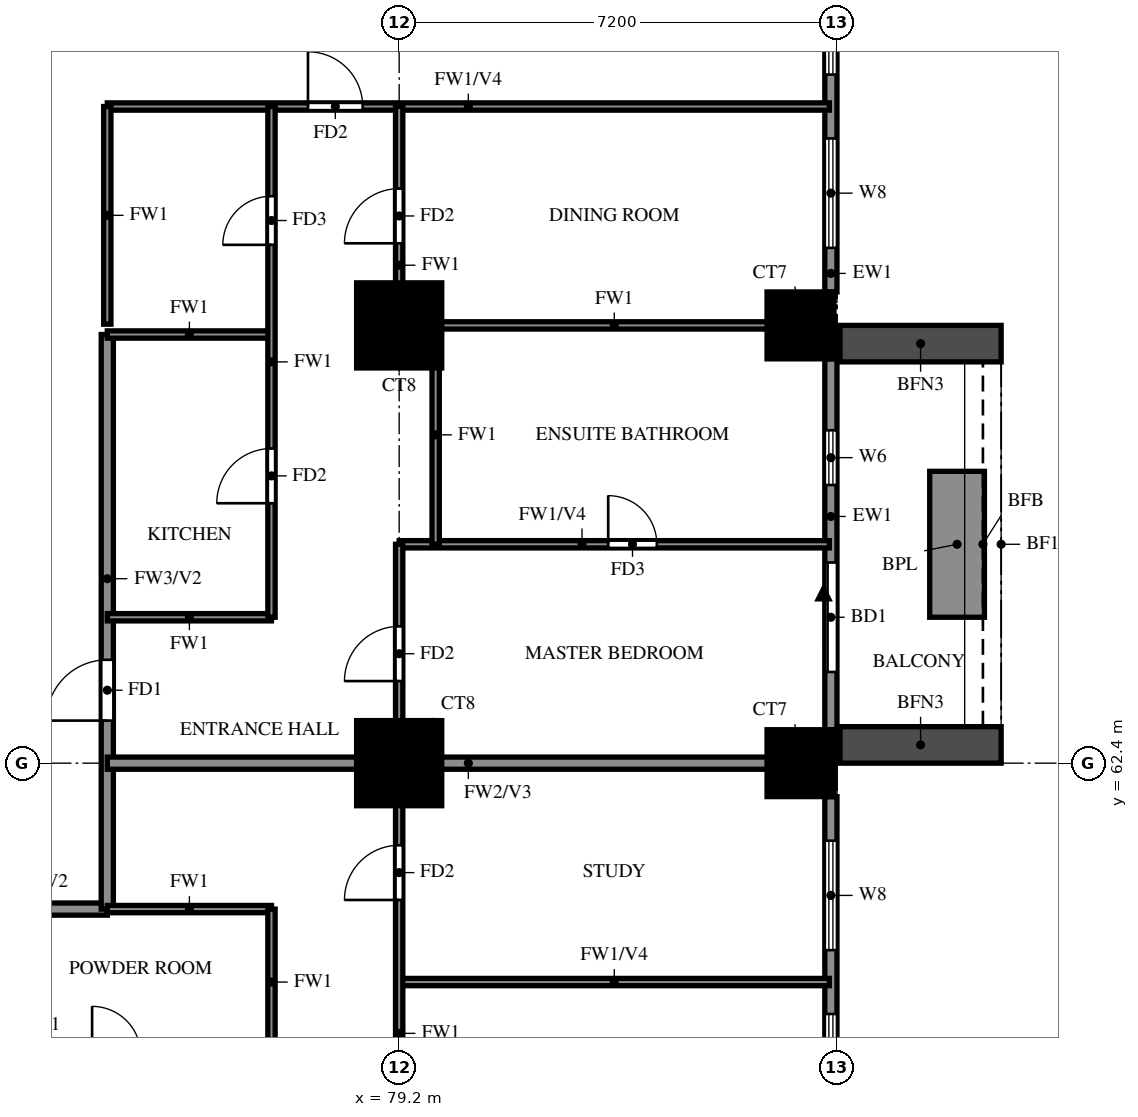
"""IFC4 building model, lengths in metres.
Left out: names, types, materials, properties, quantities, classifications, styles, units other than length and angle.
Written with IfcOpenShell. Run it as: python <this file> out.ifc"""

import sys

from ifc_helpers import new_model, si_unit, direction, frame, frame_2d, origin, origin_2d, place, context, subcontext, project, spatial, rectangle, extrude, source, transform, mapped, element, fill, save


model = new_model("IFC4")
c1 = context("Model", 3, precision=1e-05, world=origin(), true_north=direction((0.0, 1.0)))
c2 = subcontext(c1, "Body", "Model", "MODEL_VIEW")
j1 = project(units=[si_unit("LENGTHUNIT", "METRE"), si_unit("PLANEANGLEUNIT", "RADIAN")], contexts=[c1])
p1 = place(None, origin())
s1 = spatial("IfcSite", under=j1, at=p1, CompositionType="ELEMENT")
p2 = place(p1, origin())
s2 = spatial("IfcBuilding", under=s1, at=p2, CompositionType="ELEMENT")
p3 = place(p2, frame((0.0, 0.0, 41.0)))
s3 = spatial("IfcBuildingStorey", under=s2, at=p3, CompositionType="ELEMENT", Elevation=41.0)
m1 = source(origin(), c2, "Body", "SweptSolid", [
    extrude(rectangle(XDim=1.4, YDim=1.4, at=origin_2d()), origin(), (0.0, 0.0, 1.0), 3.18),
])
p4 = place(p3, frame((79.2, 62.4, 0.0), z_axis=(0.0, 0.0, 1.0), x_axis=(1.0, 0.0, 0.0)))
e1 = element("IfcColumn", 1, at=p4, inside=s3, PredefinedType="COLUMN", context=c2, shape_type="MappedRepresentation", body=[
    mapped(m1, transform((0.0, 0.0, 0.0))),
])
m2 = source(origin(), c2, "Body", "SweptSolid", [
    extrude(rectangle(XDim=1.1, YDim=1.1, at=origin_2d()), origin(), (0.0, 0.0, 1.0), 3.18),
])
p5 = place(p3, frame((85.8, 62.4, 0.0), z_axis=(0.0, 0.0, 1.0), x_axis=(1.0, 0.0, 0.0)))
e2 = element("IfcColumn", 2, at=p5, inside=s3, PredefinedType="COLUMN", context=c2, shape_type="MappedRepresentation", body=[
    mapped(m2, transform((0.0, 0.0, 0.0))),
])
p6 = place(p3, frame((79.2, 69.6, 0.0), z_axis=(0.0, 0.0, 1.0), x_axis=(1.0, 0.0, 0.0)))
e3 = element("IfcColumn", 3, at=p6, inside=s3, PredefinedType="COLUMN", context=c2, shape_type="MappedRepresentation", body=[
    mapped(m1, transform((0.0, 0.0, 0.0))),
])
p7 = place(p3, frame((85.8, 69.6, 0.0), z_axis=(0.0, 0.0, 1.0), x_axis=(1.0, 0.0, 0.0)))
e4 = element("IfcColumn", 4, at=p7, inside=s3, PredefinedType="COLUMN", context=c2, shape_type="MappedRepresentation", body=[
    mapped(m2, transform((0.0, 0.0, 0.0))),
])
p8 = place(p3, frame((86.3, 55.75, 0.0), z_axis=(0.0, 0.0, 1.0), x_axis=(0.0, 1.0, 0.0)))
e5 = element("IfcWall", 5, at=p8, inside=s3, PredefinedType="SOLIDWALL", context=c2, shape_type="SweptSolid", body=[
    extrude(rectangle(XDim=6.1, YDim=0.2, at=frame_2d((3.05, 0.0))), origin(), (0.0, 0.0, 1.0), 3.18),
])
p9 = place(p8, frame((0.725, 0.0, 0.6)))
e6 = element("IfcOpeningElement", 6, at=p9, cuts=e5, PredefinedType="OPENING", context=c2, shape_type="SweptSolid", body=[
    extrude(rectangle(XDim=1.8, YDim=2.4, at=frame_2d((0.9, 1.2))), frame((0.0, 0.11, 0.0), z_axis=(0.0, -1.0, 0.0), x_axis=(1.0, 0.0, 0.0)), (0.0, 0.0, 1.0), 0.22),
])
p10 = place(p8, frame((3.575, 0.0, 0.6)))
e7 = element("IfcOpeningElement", 7, at=p10, cuts=e5, PredefinedType="OPENING", context=c2, shape_type="SweptSolid", body=[
    extrude(rectangle(XDim=1.8, YDim=2.4, at=frame_2d((0.9, 1.2))), frame((0.0, 0.11, 0.0), z_axis=(0.0, -1.0, 0.0), x_axis=(1.0, 0.0, 0.0)), (0.0, 0.0, 1.0), 0.22),
])
p11 = place(p3, frame((86.3, 62.95, 0.0), z_axis=(0.0, 0.0, 1.0), x_axis=(0.0, 1.0, 0.0)))
e8 = element("IfcWall", 8, at=p11, inside=s3, PredefinedType="SOLIDWALL", context=c2, shape_type="SweptSolid", body=[
    extrude(rectangle(XDim=6.1, YDim=0.2, at=frame_2d((3.05, 0.0))), origin(), (0.0, 0.0, 1.0), 3.18),
])
p12 = place(p11, frame((0.95, 0.0, 0.0)))
e9 = element("IfcOpeningElement", 9, at=p12, cuts=e8, PredefinedType="OPENING", context=c2, shape_type="SweptSolid", body=[
    extrude(rectangle(XDim=1.8, YDim=2.4, at=frame_2d((0.9, 1.2))), frame((0.0, 0.11, 0.0), z_axis=(0.0, -1.0, 0.0), x_axis=(1.0, 0.0, 0.0)), (0.0, 0.0, 1.0), 0.22),
])
p13 = place(p11, frame((4.025, 0.0, 1.5)))
e10 = element("IfcOpeningElement", 10, at=p13, cuts=e8, PredefinedType="OPENING", context=c2, shape_type="SweptSolid", body=[
    extrude(rectangle(XDim=0.9, YDim=0.9, at=frame_2d((0.45, 0.45))), frame((0.0, 0.11, 0.0), z_axis=(0.0, -1.0, 0.0), x_axis=(1.0, 0.0, 0.0)), (0.0, 0.0, 1.0), 0.22),
])
p14 = place(p3, frame((86.3, 70.15, 0.0), z_axis=(0.0, 0.0, 1.0), x_axis=(0.0, 1.0, 0.0)))
e11 = element("IfcWall", 11, at=p14, inside=s3, PredefinedType="SOLIDWALL", context=c2, shape_type="SweptSolid", body=[
    extrude(rectangle(XDim=6.1, YDim=0.2, at=frame_2d((3.05, 0.0))), origin(), (0.0, 0.0, 1.0), 3.18),
])
p15 = place(p14, frame((0.725, 0.0, 0.6)))
e12 = element("IfcOpeningElement", 12, at=p15, cuts=e11, PredefinedType="OPENING", context=c2, shape_type="SweptSolid", body=[
    extrude(rectangle(XDim=1.8, YDim=2.4, at=frame_2d((0.9, 1.2))), frame((0.0, 0.11, 0.0), z_axis=(0.0, -1.0, 0.0), x_axis=(1.0, 0.0, 0.0)), (0.0, 0.0, 1.0), 0.22),
])
p16 = place(p14, frame((3.575, 0.0, 0.6)))
e13 = element("IfcOpeningElement", 13, at=p16, cuts=e11, PredefinedType="OPENING", context=c2, shape_type="SweptSolid", body=[
    extrude(rectangle(XDim=1.8, YDim=2.4, at=frame_2d((0.9, 1.2))), frame((0.0, 0.11, 0.0), z_axis=(0.0, -1.0, 0.0), x_axis=(1.0, 0.0, 0.0)), (0.0, 0.0, 1.0), 0.22),
])
for number, where, z_axis, x_axis in (
    (14, (86.45, 62.7, 0.0), (0.0, 0.0, 1.0), (1.0, 0.0, 0.0)),
    (15, (86.45, 69.3, 0.0), (0.0, 0.0, 1.0), (1.0, 0.0, 0.0)),
):
    element("IfcWall", number, at=place(p3, frame(where, z_axis=z_axis, x_axis=x_axis)), inside=s3, PredefinedType="SOLIDWALL", context=c2, shape_type="SweptSolid", body=[
        extrude(rectangle(XDim=2.65, YDim=0.6, at=frame_2d((1.325, 0.0))), origin(), (0.0, 0.0, 1.0), 2.85),
    ])
p17 = place(p3, frame((88.375, 64.8, 0.0), z_axis=(0.0, 0.0, 1.0), x_axis=(0.0, 1.0, 0.0)))
e16 = element("IfcWall", 16, at=p17, inside=s3, PredefinedType="SOLIDWALL", context=c2, shape_type="SweptSolid", body=[
    extrude(rectangle(XDim=2.4, YDim=0.9, at=frame_2d((1.2, 0.0))), origin(), (0.0, 0.0, 1.0), 0.9),
])
p18 = place(p3, frame((72.0, 60.0, 0.0), z_axis=(0.0, 0.0, 1.0), x_axis=(1.0, 0.0, 0.0)))
e17 = element("IfcWall", 17, at=p18, inside=s3, PredefinedType="SOLIDWALL", context=c2, shape_type="SweptSolid", body=[
    extrude(rectangle(XDim=2.4, YDim=0.2, at=frame_2d((1.2, 0.0))), origin(), (0.0, 0.0, 1.0), 3.18),
])
p19 = place(p3, frame((74.4, 60.0, 0.0), z_axis=(0.0, 0.0, 1.0), x_axis=(0.0, 1.0, 0.0)))
e18 = element("IfcWall", 18, at=p19, inside=s3, PredefinedType="SOLIDWALL", context=c2, shape_type="SweptSolid", body=[
    extrude(rectangle(XDim=9.45, YDim=0.2, at=frame_2d((4.725, 0.0))), origin(), (0.0, 0.0, 1.0), 3.18),
])
p20 = place(p19, frame((3.1, 0.0, 0.0)))
e19 = element("IfcOpeningElement", 19, at=p20, cuts=e18, PredefinedType="OPENING", context=c2, shape_type="SweptSolid", body=[
    extrude(rectangle(XDim=1.0, YDim=2.1, at=frame_2d((0.5, 1.05))), frame((0.0, 0.11, 0.0), z_axis=(0.0, -1.0, 0.0), x_axis=(1.0, 0.0, 0.0)), (0.0, 0.0, 1.0), 0.22),
])
p21 = place(p3, frame((74.4, 62.4, 0.0), z_axis=(0.0, 0.0, 1.0), x_axis=(1.0, 0.0, 0.0)))
e20 = element("IfcWall", 20, at=p21, inside=s3, PredefinedType="SOLIDWALL", context=c2, shape_type="SweptSolid", body=[
    extrude(rectangle(XDim=11.875, YDim=0.2, at=frame_2d((5.938, 0.0))), origin(), (0.0, 0.0, 1.0), 3.18),
])
p22 = place(p3, frame((79.2, 58.8, 0.0), z_axis=(0.0, 0.0, 1.0), x_axis=(1.0, 0.0, 0.0)))
e21 = element("IfcWall", 21, at=p22, inside=s3, PredefinedType="PARTITIONING", context=c2, shape_type="SweptSolid", body=[
    extrude(rectangle(XDim=7.075, YDim=0.12, at=frame_2d((3.538, 0.0))), origin(), (0.0, 0.0, 1.0), 2.28),
])
for number, where, z_axis, x_axis in (
    (22, (74.4, 60.0, 0.0), (0.0, 0.0, 1.0), (1.0, 0.0, 0.0)),
    (23, (74.4, 64.8, 0.0), (0.0, 0.0, 1.0), (1.0, 0.0, 0.0)),
):
    element("IfcWall", number, at=place(p3, frame(where, z_axis=z_axis, x_axis=x_axis)), inside=s3, PredefinedType="PARTITIONING", context=c2, shape_type="SweptSolid", body=[
        extrude(rectangle(XDim=2.7, YDim=0.12, at=frame_2d((1.35, 0.0))), origin(), (0.0, 0.0, 1.0), 3.18),
    ])
p23 = place(p3, frame((79.2, 66.0, 0.0), z_axis=(0.0, 0.0, 1.0), x_axis=(1.0, 0.0, 0.0)))
e24 = element("IfcWall", 24, at=p23, inside=s3, PredefinedType="PARTITIONING", context=c2, shape_type="SweptSolid", body=[
    extrude(rectangle(XDim=7.075, YDim=0.12, at=frame_2d((3.538, 0.0))), origin(), (0.0, 0.0, 1.0), 2.28),
])
p24 = place(p23, frame((3.438, 0.0, 0.0)))
e25 = element("IfcOpeningElement", 25, at=p24, cuts=e24, PredefinedType="OPENING", context=c2, shape_type="SweptSolid", body=[
    extrude(rectangle(XDim=0.8, YDim=2.1, at=frame_2d((0.4, 1.05))), frame((0.0, 0.07, 0.0), z_axis=(0.0, -1.0, 0.0), x_axis=(1.0, 0.0, 0.0)), (0.0, 0.0, 1.0), 0.14),
])
p25 = place(p3, frame((74.4, 69.45, 0.0), z_axis=(0.0, 0.0, 1.0), x_axis=(1.0, 0.0, 0.0)))
e26 = element("IfcWall", 26, at=p25, inside=s3, PredefinedType="PARTITIONING", context=c2, shape_type="SweptSolid", body=[
    extrude(rectangle(XDim=2.7, YDim=0.12, at=frame_2d((1.35, 0.0))), origin(), (0.0, 0.0, 1.0), 3.18),
])
p26 = place(p3, frame((79.2, 69.6, 0.0), z_axis=(0.0, 0.0, 1.0), x_axis=(1.0, 0.0, 0.0)))
e27 = element("IfcWall", 27, at=p26, inside=s3, PredefinedType="PARTITIONING", context=c2, shape_type="SweptSolid", body=[
    extrude(rectangle(XDim=7.075, YDim=0.12, at=frame_2d((3.538, 0.0))), origin(), (0.0, 0.0, 1.0), 3.18),
])
p27 = place(p3, frame((74.4, 73.2, 0.0), z_axis=(0.0, 0.0, 1.0), x_axis=(1.0, 0.0, 0.0)))
e28 = element("IfcWall", 28, at=p27, inside=s3, PredefinedType="PARTITIONING", context=c2, shape_type="SweptSolid", body=[
    extrude(rectangle(XDim=11.875, YDim=0.12, at=frame_2d((5.938, 0.0))), origin(), (0.0, 0.0, 1.0), 2.28),
])
p28 = place(p27, frame((3.3, 0.0, 0.0)))
e29 = element("IfcOpeningElement", 29, at=p28, cuts=e28, PredefinedType="OPENING", context=c2, shape_type="SweptSolid", body=[
    extrude(rectangle(XDim=0.9, YDim=2.1, at=frame_2d((0.45, 1.05))), frame((0.0, 0.07, 0.0), z_axis=(0.0, -1.0, 0.0), x_axis=(1.0, 0.0, 0.0)), (0.0, 0.0, 1.0), 0.14),
])
p29 = place(p3, frame((74.4, 69.62, 0.0), z_axis=(0.0, 0.0, 1.0), x_axis=(0.0, 1.0, 0.0)))
e30 = element("IfcWall", 30, at=p29, inside=s3, PredefinedType="PARTITIONING", context=c2, shape_type="SweptSolid", body=[
    extrude(rectangle(XDim=3.58, YDim=0.12, at=frame_2d((1.79, 0.0))), origin(), (0.0, 0.0, 1.0), 3.18),
])
p30 = place(p3, frame((77.1, 57.6, 0.0), z_axis=(0.0, 0.0, 1.0), x_axis=(0.0, 1.0, 0.0)))
e31 = element("IfcWall", 31, at=p30, inside=s3, PredefinedType="PARTITIONING", context=c2, shape_type="SweptSolid", body=[
    extrude(rectangle(XDim=2.4, YDim=0.12, at=frame_2d((1.2, 0.0))), origin(), (0.0, 0.0, 1.0), 3.18),
])
p31 = place(p3, frame((77.1, 64.8, 0.0), z_axis=(0.0, 0.0, 1.0), x_axis=(0.0, 1.0, 0.0)))
e32 = element("IfcWall", 32, at=p31, inside=s3, PredefinedType="PARTITIONING", context=c2, shape_type="SweptSolid", body=[
    extrude(rectangle(XDim=8.4, YDim=0.12, at=frame_2d((4.2, 0.0))), origin(), (0.0, 0.0, 1.0), 3.18),
])
p32 = place(p31, frame((1.875, 0.0, 0.0)))
e33 = element("IfcOpeningElement", 33, at=p32, cuts=e32, PredefinedType="OPENING", context=c2, shape_type="SweptSolid", body=[
    extrude(rectangle(XDim=0.9, YDim=2.1, at=frame_2d((0.45, 1.05))), frame((0.0, 0.07, 0.0), z_axis=(0.0, -1.0, 0.0), x_axis=(1.0, 0.0, 0.0)), (0.0, 0.0, 1.0), 0.14),
])
p33 = place(p31, frame((6.125, 0.0, 0.0)))
e34 = element("IfcOpeningElement", 34, at=p33, cuts=e32, PredefinedType="OPENING", context=c2, shape_type="SweptSolid", body=[
    extrude(rectangle(XDim=0.8, YDim=2.1, at=frame_2d((0.4, 1.05))), frame((0.0, 0.07, 0.0), z_axis=(0.0, -1.0, 0.0), x_axis=(1.0, 0.0, 0.0)), (0.0, 0.0, 1.0), 0.14),
])
p34 = place(p3, frame((79.2, 48.125, 0.0), z_axis=(0.0, 0.0, 1.0), x_axis=(0.0, 1.0, 0.0)))
e35 = element("IfcWall", 35, at=p34, inside=s3, PredefinedType="PARTITIONING", context=c2, shape_type="SweptSolid", body=[
    extrude(rectangle(XDim=17.875, YDim=0.12, at=frame_2d((8.938, 0.0))), origin(), (0.0, 0.0, 1.0), 3.18),
])
p35 = place(p34, frame((1.288, 0.0, 0.0)))
e36 = element("IfcOpeningElement", 36, at=p35, cuts=e35, PredefinedType="OPENING", context=c2, shape_type="SweptSolid", body=[
    extrude(rectangle(XDim=0.9, YDim=2.1, at=frame_2d((0.45, 1.05))), frame((0.0, 0.07, 0.0), z_axis=(0.0, -1.0, 0.0), x_axis=(1.0, 0.0, 0.0)), (0.0, 0.0, 1.0), 0.14),
])
p36 = place(p34, frame((7.825, 0.0, 0.0)))
e37 = element("IfcOpeningElement", 37, at=p36, cuts=e35, PredefinedType="OPENING", context=c2, shape_type="SweptSolid", body=[
    extrude(rectangle(XDim=1.5, YDim=2.1, at=frame_2d((0.75, 1.05))), frame((0.0, 0.07, 0.0), z_axis=(0.0, -1.0, 0.0), x_axis=(1.0, 0.0, 0.0)), (0.0, 0.0, 1.0), 0.14),
])
p37 = place(p34, frame((12.025, 0.0, 0.0)))
e38 = element("IfcOpeningElement", 38, at=p37, cuts=e35, PredefinedType="OPENING", context=c2, shape_type="SweptSolid", body=[
    extrude(rectangle(XDim=0.9, YDim=2.1, at=frame_2d((0.45, 1.05))), frame((0.0, 0.07, 0.0), z_axis=(0.0, -1.0, 0.0), x_axis=(1.0, 0.0, 0.0)), (0.0, 0.0, 1.0), 0.14),
])
p38 = place(p34, frame((15.625, 0.0, 0.0)))
e39 = element("IfcOpeningElement", 39, at=p38, cuts=e35, PredefinedType="OPENING", context=c2, shape_type="SweptSolid", body=[
    extrude(rectangle(XDim=0.9, YDim=2.1, at=frame_2d((0.45, 1.05))), frame((0.0, 0.07, 0.0), z_axis=(0.0, -1.0, 0.0), x_axis=(1.0, 0.0, 0.0)), (0.0, 0.0, 1.0), 0.14),
])
p39 = place(p3, frame((79.2, 69.6, 0.0), z_axis=(0.0, 0.0, 1.0), x_axis=(0.0, 1.0, 0.0)))
e40 = element("IfcWall", 40, at=p39, inside=s3, PredefinedType="PARTITIONING", context=c2, shape_type="SweptSolid", body=[
    extrude(rectangle(XDim=3.6, YDim=0.12, at=frame_2d((1.8, 0.0))), origin(), (0.0, 0.0, 1.0), 3.18),
])
p40 = place(p39, frame((1.35, 0.0, 0.0)))
e41 = element("IfcOpeningElement", 41, at=p40, cuts=e40, PredefinedType="OPENING", context=c2, shape_type="SweptSolid", body=[
    extrude(rectangle(XDim=0.9, YDim=2.1, at=frame_2d((0.45, 1.05))), frame((0.0, 0.07, 0.0), z_axis=(0.0, -1.0, 0.0), x_axis=(1.0, 0.0, 0.0)), (0.0, 0.0, 1.0), 0.14),
])
p41 = place(p3, frame((79.8, 66.0, 0.0), z_axis=(0.0, 0.0, 1.0), x_axis=(0.0, 1.0, 0.0)))
e42 = element("IfcWall", 42, at=p41, inside=s3, PredefinedType="PARTITIONING", context=c2, shape_type="SweptSolid", body=[
    extrude(rectangle(XDim=3.6, YDim=0.12, at=frame_2d((1.8, 0.0))), origin(), (0.0, 0.0, 1.0), 3.18),
])
p42 = place(p9, origin())
e43 = element("IfcWindow", 43, at=p42, inside=s3, PartitioningType="DOUBLE_PANEL_VERTICAL", PredefinedType="WINDOW", context=c2, shape_type="SweptSolid", body=[
    extrude(rectangle(XDim=1.8, YDim=2.4, at=frame_2d((0.9, 1.2))), frame((0.0, 0.03, 0.0), z_axis=(0.0, -1.0, 0.0), x_axis=(1.0, 0.0, 0.0)), (0.0, 0.0, 1.0), 0.06),
])
fill(e6, e43)
p43 = place(p10, origin())
e44 = element("IfcWindow", 44, at=p43, inside=s3, PartitioningType="DOUBLE_PANEL_VERTICAL", PredefinedType="WINDOW", context=c2, shape_type="SweptSolid", body=[
    extrude(rectangle(XDim=1.8, YDim=2.4, at=frame_2d((0.9, 1.2))), frame((0.0, 0.03, 0.0), z_axis=(0.0, -1.0, 0.0), x_axis=(1.0, 0.0, 0.0)), (0.0, 0.0, 1.0), 0.06),
])
fill(e7, e44)
p44 = place(p12, origin())
e45 = element("IfcDoor", 45, at=p44, inside=s3, OperationType="DOUBLE_DOOR_SLIDING", PredefinedType="DOOR", context=c2, shape_type="SweptSolid", body=[
    extrude(rectangle(XDim=1.8, YDim=2.4, at=frame_2d((0.9, 1.2))), frame((0.0, 0.025, 0.0), z_axis=(0.0, -1.0, 0.0), x_axis=(1.0, 0.0, 0.0)), (0.0, 0.0, 1.0), 0.05),
])
fill(e9, e45)
p45 = place(p13, origin())
e46 = element("IfcWindow", 46, at=p45, inside=s3, PartitioningType="SINGLE_PANEL", PredefinedType="WINDOW", context=c2, shape_type="SweptSolid", body=[
    extrude(rectangle(XDim=0.9, YDim=0.9, at=frame_2d((0.45, 0.45))), frame((0.0, 0.03, 0.0), z_axis=(0.0, -1.0, 0.0), x_axis=(1.0, 0.0, 0.0)), (0.0, 0.0, 1.0), 0.06),
])
fill(e10, e46)
p46 = place(p15, origin())
e47 = element("IfcWindow", 47, at=p46, inside=s3, PartitioningType="DOUBLE_PANEL_VERTICAL", PredefinedType="WINDOW", context=c2, shape_type="SweptSolid", body=[
    extrude(rectangle(XDim=1.8, YDim=2.4, at=frame_2d((0.9, 1.2))), frame((0.0, 0.03, 0.0), z_axis=(0.0, -1.0, 0.0), x_axis=(1.0, 0.0, 0.0)), (0.0, 0.0, 1.0), 0.06),
])
fill(e12, e47)
p47 = place(p16, origin())
e48 = element("IfcWindow", 48, at=p47, inside=s3, PartitioningType="DOUBLE_PANEL_VERTICAL", PredefinedType="WINDOW", context=c2, shape_type="SweptSolid", body=[
    extrude(rectangle(XDim=1.8, YDim=2.4, at=frame_2d((0.9, 1.2))), frame((0.0, 0.03, 0.0), z_axis=(0.0, -1.0, 0.0), x_axis=(1.0, 0.0, 0.0)), (0.0, 0.0, 1.0), 0.06),
])
fill(e13, e48)
p48 = place(p37, origin())
e49 = element("IfcDoor", 49, at=p48, inside=s3, OperationType="SINGLE_SWING_RIGHT", PredefinedType="DOOR", context=c2, shape_type="SweptSolid", body=[
    extrude(rectangle(XDim=0.9, YDim=2.1, at=frame_2d((0.45, 1.05))), frame((0.0, 0.025, 0.0), z_axis=(0.0, -1.0, 0.0), x_axis=(1.0, 0.0, 0.0)), (0.0, 0.0, 1.0), 0.05),
])
fill(e38, e49)
p49 = place(p20, origin())
e50 = element("IfcDoor", 50, at=p49, inside=s3, OperationType="SINGLE_SWING_LEFT", PredefinedType="DOOR", context=c2, shape_type="SweptSolid", body=[
    extrude(rectangle(XDim=1.0, YDim=2.1, at=frame_2d((0.5, 1.05))), frame((0.0, 0.025, 0.0), z_axis=(0.0, -1.0, 0.0), x_axis=(1.0, 0.0, 0.0)), (0.0, 0.0, 1.0), 0.05),
])
fill(e19, e50)
p50 = place(p38, origin())
e51 = element("IfcDoor", 51, at=p50, inside=s3, OperationType="SINGLE_SWING_LEFT", PredefinedType="DOOR", context=c2, shape_type="SweptSolid", body=[
    extrude(rectangle(XDim=0.9, YDim=2.1, at=frame_2d((0.45, 1.05))), frame((0.0, 0.025, 0.0), z_axis=(0.0, -1.0, 0.0), x_axis=(1.0, 0.0, 0.0)), (0.0, 0.0, 1.0), 0.05),
])
fill(e39, e51)
p51 = place(p24, origin())
e52 = element("IfcDoor", 52, at=p51, inside=s3, OperationType="SINGLE_SWING_RIGHT", PredefinedType="DOOR", context=c2, shape_type="SweptSolid", body=[
    extrude(rectangle(XDim=0.8, YDim=2.1, at=frame_2d((0.4, 1.05))), frame((0.0, 0.025, 0.0), z_axis=(0.0, -1.0, 0.0), x_axis=(1.0, 0.0, 0.0)), (0.0, 0.0, 1.0), 0.05),
])
fill(e25, e52)
p52 = place(p40, origin())
e53 = element("IfcDoor", 53, at=p52, inside=s3, OperationType="SINGLE_SWING_LEFT", PredefinedType="DOOR", context=c2, shape_type="SweptSolid", body=[
    extrude(rectangle(XDim=0.9, YDim=2.1, at=frame_2d((0.45, 1.05))), frame((0.0, 0.025, 0.0), z_axis=(0.0, -1.0, 0.0), x_axis=(1.0, 0.0, 0.0)), (0.0, 0.0, 1.0), 0.05),
])
fill(e41, e53)
p53 = place(p28, origin())
e54 = element("IfcDoor", 54, at=p53, inside=s3, OperationType="SINGLE_SWING_LEFT", PredefinedType="DOOR", context=c2, shape_type="SweptSolid", body=[
    extrude(rectangle(XDim=0.9, YDim=2.1, at=frame_2d((0.45, 1.05))), frame((0.0, 0.025, 0.0), z_axis=(0.0, -1.0, 0.0), x_axis=(1.0, 0.0, 0.0)), (0.0, 0.0, 1.0), 0.05),
])
fill(e29, e54)
p54 = place(p32, origin())
e55 = element("IfcDoor", 55, at=p54, inside=s3, OperationType="SINGLE_SWING_RIGHT", PredefinedType="DOOR", context=c2, shape_type="SweptSolid", body=[
    extrude(rectangle(XDim=0.9, YDim=2.1, at=frame_2d((0.45, 1.05))), frame((0.0, 0.025, 0.0), z_axis=(0.0, -1.0, 0.0), x_axis=(1.0, 0.0, 0.0)), (0.0, 0.0, 1.0), 0.05),
])
fill(e33, e55)
p55 = place(p33, origin())
e56 = element("IfcDoor", 56, at=p55, inside=s3, OperationType="SINGLE_SWING_LEFT", PredefinedType="DOOR", context=c2, shape_type="SweptSolid", body=[
    extrude(rectangle(XDim=0.8, YDim=2.1, at=frame_2d((0.4, 1.05))), frame((0.0, 0.025, 0.0), z_axis=(0.0, -1.0, 0.0), x_axis=(1.0, 0.0, 0.0)), (0.0, 0.0, 1.0), 0.05),
])
fill(e34, e56)
save(model, sys.argv[1])
